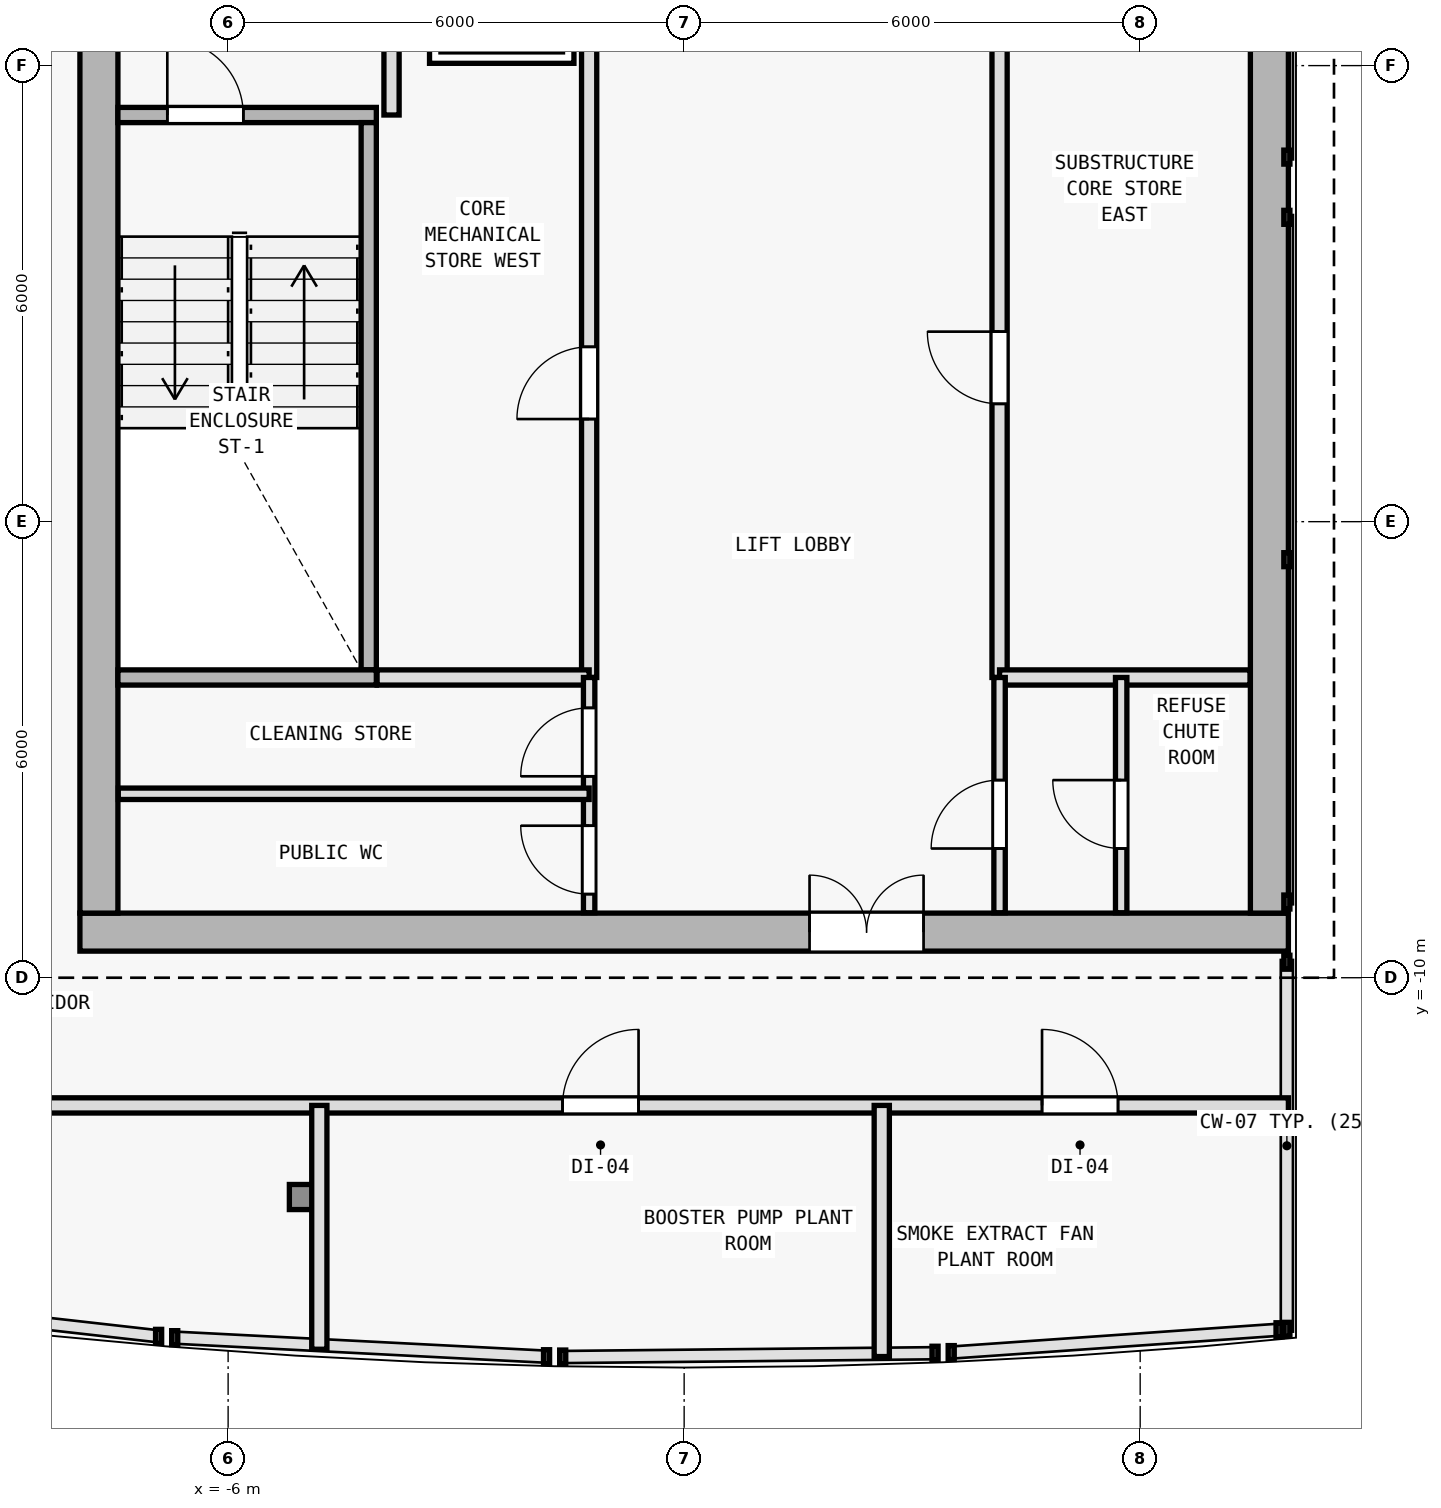
"""IFC4 building model, lengths in metres.
Left out: names, types, materials, properties, quantities, classifications, styles, units other than length and angle.
Written with IfcOpenShell. Run it as: python <this file> out.ifc"""

import sys

from ifc_helpers import new_model, si_unit, direction, frame, frame_2d, origin, origin_2d, place, context, subcontext, project, spatial, rectangle, i_section, extrude, element, fill, save


model = new_model("IFC4")
c1 = context("Model", 3, precision=1e-05, world=origin(), true_north=direction((0.0, 1.0)))
c2 = subcontext(c1, "Body", "Model", "MODEL_VIEW")
j1 = project(units=[si_unit("LENGTHUNIT", "METRE"), si_unit("PLANEANGLEUNIT", "RADIAN")], contexts=[c1])
p1 = place(None, origin())
s1 = spatial("IfcSite", under=j1, at=p1, CompositionType="ELEMENT")
p2 = place(p1, origin())
s2 = spatial("IfcBuilding", under=s1, at=p2, CompositionType="ELEMENT")
p3 = place(p2, frame((0.0, 0.0, 304.8)))
s3 = spatial("IfcBuildingStorey", under=s2, at=p3, CompositionType="ELEMENT", Elevation=304.8)
for number, where, z_axis, x_axis in (
    (1, (-7.7, -9.4, 0.0), (0.0, 0.0, 1.0), (1.0, 0.0, 0.0)),
    (2, (7.7, -9.4, 0.0), (0.0, 0.0, 1.0), (1.0, 0.0, 0.0)),
    (3, (0.0, -9.4, 0.0), (0.0, 0.0, 1.0), (1.0, 0.0, 0.0)),
    (4, (7.7, 0.4, 0.0), (0.0, 0.0, 1.0), (1.0, 0.0, 0.0)),
    (5, (-7.7, 2.0, 0.0), (0.0, 0.0, 1.0), (1.0, 0.0, 0.0)),
):
    element("IfcColumn", number, at=place(p3, frame(where, z_axis=z_axis, x_axis=x_axis)), inside=s3, PredefinedType="COLUMN", context=c2, shape_type="SweptSolid", body=[
        extrude(i_section(OverallWidth=0.374, OverallDepth=0.372, WebThickness=0.012, FlangeThickness=0.02, FilletRadius=0.015, at=origin_2d()), origin(), (0.0, 0.0, 1.0), 3.6),
    ])
p4 = place(p3, frame((-5.04, -12.885, 0.0), z_axis=(0.0, 0.0, 1.0), x_axis=(1.0, 0.0, 0.0)))
e6 = element("IfcColumn", 6, at=p4, inside=s3, PredefinedType="COLUMN", context=c2, shape_type="SweptSolid", body=[
    extrude(i_section(OverallWidth=0.309, OverallDepth=0.33, WebThickness=0.011, FlangeThickness=0.019, FilletRadius=0.027, at=origin_2d()), origin(), (0.0, 0.0, 1.0), 3.6),
])
p5 = place(p3, frame((-7.95, -9.4, 0.0), z_axis=(0.0, 0.0, 1.0), x_axis=(1.0, 0.0, 0.0)))
e7 = element("IfcWall", 7, at=p5, inside=s3, PredefinedType="SHEAR", context=c2, shape_type="SweptSolid", body=[
    extrude(rectangle(XDim=15.9, YDim=0.5, at=frame_2d((7.95, 0.0))), origin(), (0.0, 0.0, 1.0), 3.34),
])
p6 = place(p5, frame((9.6, 0.0, 0.0)))
e8 = element("IfcOpeningElement", 8, at=p6, cuts=e7, PredefinedType="OPENING", context=c2, shape_type="SweptSolid", body=[
    extrude(rectangle(XDim=1.5, YDim=2.2, at=frame_2d((0.75, 1.1))), frame((0.0, 0.26, 0.0), z_axis=(0.0, -1.0, 0.0), x_axis=(1.0, 0.0, 0.0)), (0.0, 0.0, 1.0), 0.52),
])
p7 = place(p3, frame((-7.7, -9.15, 0.0), z_axis=(0.0, 0.0, 1.0), x_axis=(0.0, 1.0, 0.0)))
e9 = element("IfcWall", 9, at=p7, inside=s3, PredefinedType="SHEAR", context=c2, shape_type="SweptSolid", body=[
    extrude(rectangle(XDim=19.1, YDim=0.5, at=frame_2d((9.55, 0.0))), origin(), (0.0, 0.0, 1.0), 3.34),
])
p8 = place(p7, frame((12.7, 0.0, 0.0)))
e10 = element("IfcOpeningElement", 10, at=p8, cuts=e9, PredefinedType="OPENING", context=c2, shape_type="SweptSolid", body=[
    extrude(rectangle(XDim=1.1, YDim=2.15, at=frame_2d((0.55, 1.075))), frame((0.0, 0.26, 0.0), z_axis=(0.0, -1.0, 0.0), x_axis=(1.0, 0.0, 0.0)), (0.0, 0.0, 1.0), 0.52),
])
p9 = place(p3, frame((7.7, 9.95, 0.0), z_axis=(0.0, 0.0, 1.0), x_axis=(0.0, -1.0, 0.0)))
e11 = element("IfcWall", 11, at=p9, inside=s3, PredefinedType="SHEAR", context=c2, shape_type="SweptSolid", body=[
    extrude(rectangle(XDim=19.1, YDim=0.5, at=frame_2d((9.55, 0.0))), origin(), (0.0, 0.0, 1.0), 3.34),
])
p10 = place(p3, frame((-7.45, 1.35, 0.0), z_axis=(0.0, 0.0, 1.0), x_axis=(1.0, 0.0, 0.0)))
e12 = element("IfcWall", 12, at=p10, inside=s3, PredefinedType="SOLIDWALL", context=c2, shape_type="SweptSolid", body=[
    extrude(rectangle(XDim=3.4, YDim=0.2, at=frame_2d((1.7, 0.0))), origin(), (0.0, 0.0, 1.0), 3.34),
])
p11 = place(p10, frame((0.65, 0.0, 0.0)))
e13 = element("IfcOpeningElement", 13, at=p11, cuts=e12, PredefinedType="OPENING", context=c2, shape_type="SweptSolid", body=[
    extrude(rectangle(XDim=1.0, YDim=2.15, at=frame_2d((0.5, 1.075))), frame((0.0, 0.11, 0.0), z_axis=(0.0, -1.0, 0.0), x_axis=(1.0, 0.0, 0.0)), (0.0, 0.0, 1.0), 0.22),
])
p12 = place(p3, frame((-4.15, -5.95, 0.0), z_axis=(0.0, 0.0, 1.0), x_axis=(0.0, 1.0, 0.0)))
e14 = element("IfcWall", 14, at=p12, inside=s3, PredefinedType="SOLIDWALL", context=c2, shape_type="SweptSolid", body=[
    extrude(rectangle(XDim=7.2, YDim=0.2, at=frame_2d((3.6, 0.0))), origin(), (0.0, 0.0, 1.0), 3.34),
])
p13 = place(p3, frame((-3.85, 1.35, 0.0), z_axis=(0.0, 0.0, 1.0), x_axis=(0.0, 1.0, 0.0)))
e15 = element("IfcWall", 15, at=p13, inside=s3, PredefinedType="SOLIDWALL", context=c2, shape_type="SweptSolid", body=[
    extrude(rectangle(XDim=8.595, YDim=0.2, at=frame_2d((4.297, 0.0))), origin(), (0.0, 0.0, 1.0), 3.34),
])
p14 = place(p13, frame((1.5, 0.0, 0.0)))
e16 = element("IfcOpeningElement", 16, at=p14, cuts=e15, PredefinedType="OPENING", context=c2, shape_type="SweptSolid", body=[
    extrude(rectangle(XDim=1.0, YDim=2.15, at=frame_2d((0.5, 1.075))), frame((0.0, 0.11, 0.0), z_axis=(0.0, -1.0, 0.0), x_axis=(1.0, 0.0, 0.0)), (0.0, 0.0, 1.0), 0.22),
])
p15 = place(p13, frame((3.18, 0.0, 0.0)))
e17 = element("IfcOpeningElement", 17, at=p15, cuts=e15, PredefinedType="OPENING", context=c2, shape_type="SweptSolid", body=[
    extrude(rectangle(XDim=1.0, YDim=2.15, at=frame_2d((0.5, 1.075))), frame((0.0, 0.11, 0.0), z_axis=(0.0, -1.0, 0.0), x_axis=(1.0, 0.0, 0.0)), (0.0, 0.0, 1.0), 0.22),
])
p16 = place(p3, frame((4.15, -6.05, 0.0), z_axis=(0.0, 0.0, 1.0), x_axis=(0.0, 1.0, 0.0)))
e18 = element("IfcWall", 18, at=p16, inside=s3, PredefinedType="SOLIDWALL", context=c2, shape_type="SweptSolid", body=[
    extrude(rectangle(XDim=8.7, YDim=0.2, at=frame_2d((4.35, 0.0))), origin(), (0.0, 0.0, 1.0), 3.34),
])
p17 = place(p16, frame((3.6, 0.0, 0.0)))
e19 = element("IfcOpeningElement", 19, at=p17, cuts=e18, PredefinedType="OPENING", context=c2, shape_type="SweptSolid", body=[
    extrude(rectangle(XDim=0.95, YDim=2.1, at=frame_2d((0.475, 1.05))), frame((0.0, 0.11, 0.0), z_axis=(0.0, -1.0, 0.0), x_axis=(1.0, 0.0, 0.0)), (0.0, 0.0, 1.0), 0.22),
])
p18 = place(p3, frame((-1.25, -6.05, 0.0), z_axis=(0.0, 0.0, 1.0), x_axis=(0.0, 1.0, 0.0)))
e20 = element("IfcWall", 20, at=p18, inside=s3, PredefinedType="SOLIDWALL", context=c2, shape_type="SweptSolid", body=[
    extrude(rectangle(XDim=8.7, YDim=0.2, at=frame_2d((4.35, 0.0))), origin(), (0.0, 0.0, 1.0), 3.34),
])
p19 = place(p18, frame((3.4, 0.0, 0.0)))
e21 = element("IfcOpeningElement", 21, at=p19, cuts=e20, PredefinedType="OPENING", context=c2, shape_type="SweptSolid", body=[
    extrude(rectangle(XDim=0.95, YDim=2.1, at=frame_2d((0.475, 1.05))), frame((0.0, 0.11, 0.0), z_axis=(0.0, -1.0, 0.0), x_axis=(1.0, 0.0, 0.0)), (0.0, 0.0, 1.0), 0.22),
])
p20 = place(p3, frame((-7.45, -6.05, 0.0), z_axis=(0.0, 0.0, 1.0), x_axis=(1.0, 0.0, 0.0)))
e22 = element("IfcWall", 22, at=p20, inside=s3, PredefinedType="SOLIDWALL", context=c2, shape_type="SweptSolid", body=[
    extrude(rectangle(XDim=3.4, YDim=0.2, at=frame_2d((1.7, 0.0))), origin(), (0.0, 0.0, 1.0), 3.34),
])
p21 = place(p3, frame((-4.04, -6.05, 0.0), z_axis=(0.0, 0.0, 1.0), x_axis=(1.0, 0.0, 0.0)))
e23 = element("IfcWall", 23, at=p21, inside=s3, PredefinedType="SOLIDWALL", context=c2, shape_type="SweptSolid", body=[
    extrude(rectangle(XDim=2.79, YDim=0.2, at=frame_2d((1.395, 0.0))), origin(), (0.0, 0.0, 1.0), 3.34),
])
p22 = place(p3, frame((4.15, -6.05, 0.0), z_axis=(0.0, 0.0, 1.0), x_axis=(1.0, 0.0, 0.0)))
e24 = element("IfcWall", 24, at=p22, inside=s3, PredefinedType="SOLIDWALL", context=c2, shape_type="SweptSolid", body=[
    extrude(rectangle(XDim=3.295, YDim=0.2, at=frame_2d((1.647, 0.0))), origin(), (0.0, 0.0, 1.0), 3.34),
])
p23 = place(p3, frame((-1.25, -9.145, 0.0), z_axis=(0.0, 0.0, 1.0), x_axis=(0.0, 1.0, 0.0)))
e25 = element("IfcWall", 25, at=p23, inside=s3, PredefinedType="PARTITIONING", context=c2, shape_type="SweptSolid", body=[
    extrude(rectangle(XDim=3.095, YDim=0.15, at=frame_2d((1.547, 0.0))), origin(), (0.0, 0.0, 1.0), 3.34),
])
p24 = place(p23, frame((1.795, 0.0, 0.0)))
e26 = element("IfcOpeningElement", 26, at=p24, cuts=e25, PredefinedType="OPENING", context=c2, shape_type="SweptSolid", body=[
    extrude(rectangle(XDim=0.9, YDim=2.1, at=frame_2d((0.45, 1.05))), frame((0.0, 0.085, 0.0), z_axis=(0.0, -1.0, 0.0), x_axis=(1.0, 0.0, 0.0)), (0.0, 0.0, 1.0), 0.17),
])
p25 = place(p23, frame((0.245, 0.0, 0.0)))
e27 = element("IfcOpeningElement", 27, at=p25, cuts=e25, PredefinedType="OPENING", context=c2, shape_type="SweptSolid", body=[
    extrude(rectangle(XDim=0.9, YDim=2.1, at=frame_2d((0.45, 1.05))), frame((0.0, 0.085, 0.0), z_axis=(0.0, -1.0, 0.0), x_axis=(1.0, 0.0, 0.0)), (0.0, 0.0, 1.0), 0.17),
])
p26 = place(p3, frame((4.15, -9.145, 0.0), z_axis=(0.0, 0.0, 1.0), x_axis=(0.0, 1.0, 0.0)))
e28 = element("IfcWall", 28, at=p26, inside=s3, PredefinedType="PARTITIONING", context=c2, shape_type="SweptSolid", body=[
    extrude(rectangle(XDim=3.095, YDim=0.15, at=frame_2d((1.547, 0.0))), origin(), (0.0, 0.0, 1.0), 3.34),
])
p27 = place(p26, frame((0.845, 0.0, 0.0)))
e29 = element("IfcOpeningElement", 29, at=p27, cuts=e28, PredefinedType="OPENING", context=c2, shape_type="SweptSolid", body=[
    extrude(rectangle(XDim=0.9, YDim=2.1, at=frame_2d((0.45, 1.05))), frame((0.0, 0.085, 0.0), z_axis=(0.0, -1.0, 0.0), x_axis=(1.0, 0.0, 0.0)), (0.0, 0.0, 1.0), 0.17),
])
p28 = place(p3, frame((-7.445, -7.58, 0.0), z_axis=(0.0, 0.0, 1.0), x_axis=(1.0, 0.0, 0.0)))
e30 = element("IfcWall", 30, at=p28, inside=s3, PredefinedType="PARTITIONING", context=c2, shape_type="SweptSolid", body=[
    extrude(rectangle(XDim=6.195, YDim=0.15, at=frame_2d((3.098, 0.0))), origin(), (0.0, 0.0, 1.0), 3.34),
])
p29 = place(p3, frame((5.75, -9.145, 0.0), z_axis=(0.0, 0.0, 1.0), x_axis=(0.0, 1.0, 0.0)))
e31 = element("IfcWall", 31, at=p29, inside=s3, PredefinedType="PARTITIONING", context=c2, shape_type="SweptSolid", body=[
    extrude(rectangle(XDim=3.095, YDim=0.15, at=frame_2d((1.547, 0.0))), origin(), (0.0, 0.0, 1.0), 3.34),
])
p30 = place(p29, frame((0.845, 0.0, 0.0)))
e32 = element("IfcOpeningElement", 32, at=p30, cuts=e31, PredefinedType="OPENING", context=c2, shape_type="SweptSolid", body=[
    extrude(rectangle(XDim=0.9, YDim=2.1, at=frame_2d((0.45, 1.05))), frame((0.0, 0.085, 0.0), z_axis=(0.0, -1.0, 0.0), x_axis=(1.0, 0.0, 0.0)), (0.0, 0.0, 1.0), 0.17),
])
p31 = place(p3, frame((-10.18, -11.68, 0.0), z_axis=(0.0, 0.0, 1.0), x_axis=(1.0, 0.0, 0.0)))
e33 = element("IfcWall", 33, at=p31, inside=s3, PredefinedType="SOLIDWALL", context=c2, shape_type="SweptSolid", body=[
    extrude(rectangle(XDim=18.13, YDim=0.2, at=frame_2d((9.065, 0.0))), origin(), (0.0, 0.0, 1.0), 2.995),
])
p32 = place(p31, frame((8.58, 0.0, 0.0)))
e34 = element("IfcOpeningElement", 34, at=p32, cuts=e33, PredefinedType="OPENING", context=c2, shape_type="SweptSolid", body=[
    extrude(rectangle(XDim=1.0, YDim=2.15, at=frame_2d((0.5, 1.075))), frame((0.0, 0.11, 0.0), z_axis=(0.0, -1.0, 0.0), x_axis=(1.0, 0.0, 0.0)), (0.0, 0.0, 1.0), 0.22),
])
p33 = place(p31, frame((14.889, 0.0, 0.0)))
e35 = element("IfcOpeningElement", 35, at=p33, cuts=e33, PredefinedType="OPENING", context=c2, shape_type="SweptSolid", body=[
    extrude(rectangle(XDim=1.0, YDim=2.15, at=frame_2d((0.5, 1.075))), frame((0.0, 0.11, 0.0), z_axis=(0.0, -1.0, 0.0), x_axis=(1.0, 0.0, 0.0)), (0.0, 0.0, 1.0), 0.22),
])
p34 = place(p3, frame((-4.8, -14.888, 0.0), z_axis=(0.0, 0.0, 1.0), x_axis=(0.0, 1.0, 0.0)))
e36 = element("IfcWall", 36, at=p34, inside=s3, PredefinedType="SOLIDWALL", context=c2, shape_type="SweptSolid", body=[
    extrude(rectangle(XDim=3.208, YDim=0.2, at=frame_2d((1.604, 0.0))), origin(), (0.0, 0.0, 1.0), 2.995),
])
p35 = place(p3, frame((2.6, -14.984, 0.0), z_axis=(0.0, 0.0, 1.0), x_axis=(0.0, 1.0, 0.0)))
e37 = element("IfcWall", 37, at=p35, inside=s3, PredefinedType="SOLIDWALL", context=c2, shape_type="SweptSolid", body=[
    extrude(rectangle(XDim=3.304, YDim=0.2, at=frame_2d((1.652, 0.0))), origin(), (0.0, 0.0, 1.0), 3.34),
])
p36 = place(p6, origin())
e38 = element("IfcDoor", 38, at=p36, inside=s3, OperationType="DOUBLE_DOOR_SINGLE_SWING", PredefinedType="DOOR", context=c2, shape_type="SweptSolid", body=[
    extrude(rectangle(XDim=1.5, YDim=2.2, at=frame_2d((0.75, 1.1))), frame((0.0, 0.025, 0.0), z_axis=(0.0, -1.0, 0.0), x_axis=(1.0, 0.0, 0.0)), (0.0, 0.0, 1.0), 0.05),
])
fill(e8, e38)
p37 = place(p11, origin())
e39 = element("IfcDoor", 39, at=p37, inside=s3, OperationType="SINGLE_SWING_LEFT", PredefinedType="DOOR", context=c2, shape_type="SweptSolid", body=[
    extrude(rectangle(XDim=1.0, YDim=2.15, at=frame_2d((0.5, 1.075))), frame((0.0, 0.025, 0.0), z_axis=(0.0, -1.0, 0.0), x_axis=(1.0, 0.0, 0.0)), (0.0, 0.0, 1.0), 0.05),
])
fill(e13, e39)
p38 = place(p17, origin())
e40 = element("IfcDoor", 40, at=p38, inside=s3, OperationType="SINGLE_SWING_RIGHT", PredefinedType="DOOR", context=c2, shape_type="SweptSolid", body=[
    extrude(rectangle(XDim=0.95, YDim=2.1, at=frame_2d((0.475, 1.05))), frame((0.0, 0.025, 0.0), z_axis=(0.0, -1.0, 0.0), x_axis=(1.0, 0.0, 0.0)), (0.0, 0.0, 1.0), 0.05),
])
fill(e19, e40)
p39 = place(p19, origin())
e41 = element("IfcDoor", 41, at=p39, inside=s3, OperationType="SINGLE_SWING_LEFT", PredefinedType="DOOR", context=c2, shape_type="SweptSolid", body=[
    extrude(rectangle(XDim=0.95, YDim=2.1, at=frame_2d((0.475, 1.05))), frame((0.0, 0.025, 0.0), z_axis=(0.0, -1.0, 0.0), x_axis=(1.0, 0.0, 0.0)), (0.0, 0.0, 1.0), 0.05),
])
fill(e21, e41)
p40 = place(p24, origin())
e42 = element("IfcDoor", 42, at=p40, inside=s3, OperationType="SINGLE_SWING_LEFT", PredefinedType="DOOR", context=c2, shape_type="SweptSolid", body=[
    extrude(rectangle(XDim=0.9, YDim=2.1, at=frame_2d((0.45, 1.05))), frame((0.0, 0.025, 0.0), z_axis=(0.0, -1.0, 0.0), x_axis=(1.0, 0.0, 0.0)), (0.0, 0.0, 1.0), 0.05),
])
fill(e26, e42)
p41 = place(p25, origin())
e43 = element("IfcDoor", 43, at=p41, inside=s3, OperationType="SINGLE_SWING_RIGHT", PredefinedType="DOOR", context=c2, shape_type="SweptSolid", body=[
    extrude(rectangle(XDim=0.9, YDim=2.1, at=frame_2d((0.45, 1.05))), frame((0.0, 0.025, 0.0), z_axis=(0.0, -1.0, 0.0), x_axis=(1.0, 0.0, 0.0)), (0.0, 0.0, 1.0), 0.05),
])
fill(e27, e43)
p42 = place(p27, origin())
e44 = element("IfcDoor", 44, at=p42, inside=s3, OperationType="SINGLE_SWING_LEFT", PredefinedType="DOOR", context=c2, shape_type="SweptSolid", body=[
    extrude(rectangle(XDim=0.9, YDim=2.1, at=frame_2d((0.45, 1.05))), frame((0.0, 0.025, 0.0), z_axis=(0.0, -1.0, 0.0), x_axis=(1.0, 0.0, 0.0)), (0.0, 0.0, 1.0), 0.05),
])
fill(e29, e44)
p43 = place(p30, origin())
e45 = element("IfcDoor", 45, at=p43, inside=s3, OperationType="SINGLE_SWING_RIGHT", PredefinedType="DOOR", context=c2, shape_type="SweptSolid", body=[
    extrude(rectangle(XDim=0.9, YDim=2.1, at=frame_2d((0.45, 1.05))), frame((0.0, 0.025, 0.0), z_axis=(0.0, -1.0, 0.0), x_axis=(1.0, 0.0, 0.0)), (0.0, 0.0, 1.0), 0.05),
])
fill(e32, e45)
p44 = place(p32, origin())
e46 = element("IfcDoor", 46, at=p44, inside=s3, OperationType="SINGLE_SWING_RIGHT", PredefinedType="DOOR", context=c2, shape_type="SweptSolid", body=[
    extrude(rectangle(XDim=1.0, YDim=2.15, at=frame_2d((0.5, 1.075))), frame((0.0, 0.025, 0.0), z_axis=(0.0, -1.0, 0.0), x_axis=(1.0, 0.0, 0.0)), (0.0, 0.0, 1.0), 0.05),
])
fill(e34, e46)
p45 = place(p33, origin())
e47 = element("IfcDoor", 47, at=p45, inside=s3, OperationType="SINGLE_SWING_LEFT", PredefinedType="DOOR", context=c2, shape_type="SweptSolid", body=[
    extrude(rectangle(XDim=1.0, YDim=2.15, at=frame_2d((0.5, 1.075))), frame((0.0, 0.025, 0.0), z_axis=(0.0, -1.0, 0.0), x_axis=(1.0, 0.0, 0.0)), (0.0, 0.0, 1.0), 0.05),
])
fill(e35, e47)
save(model, sys.argv[1])
